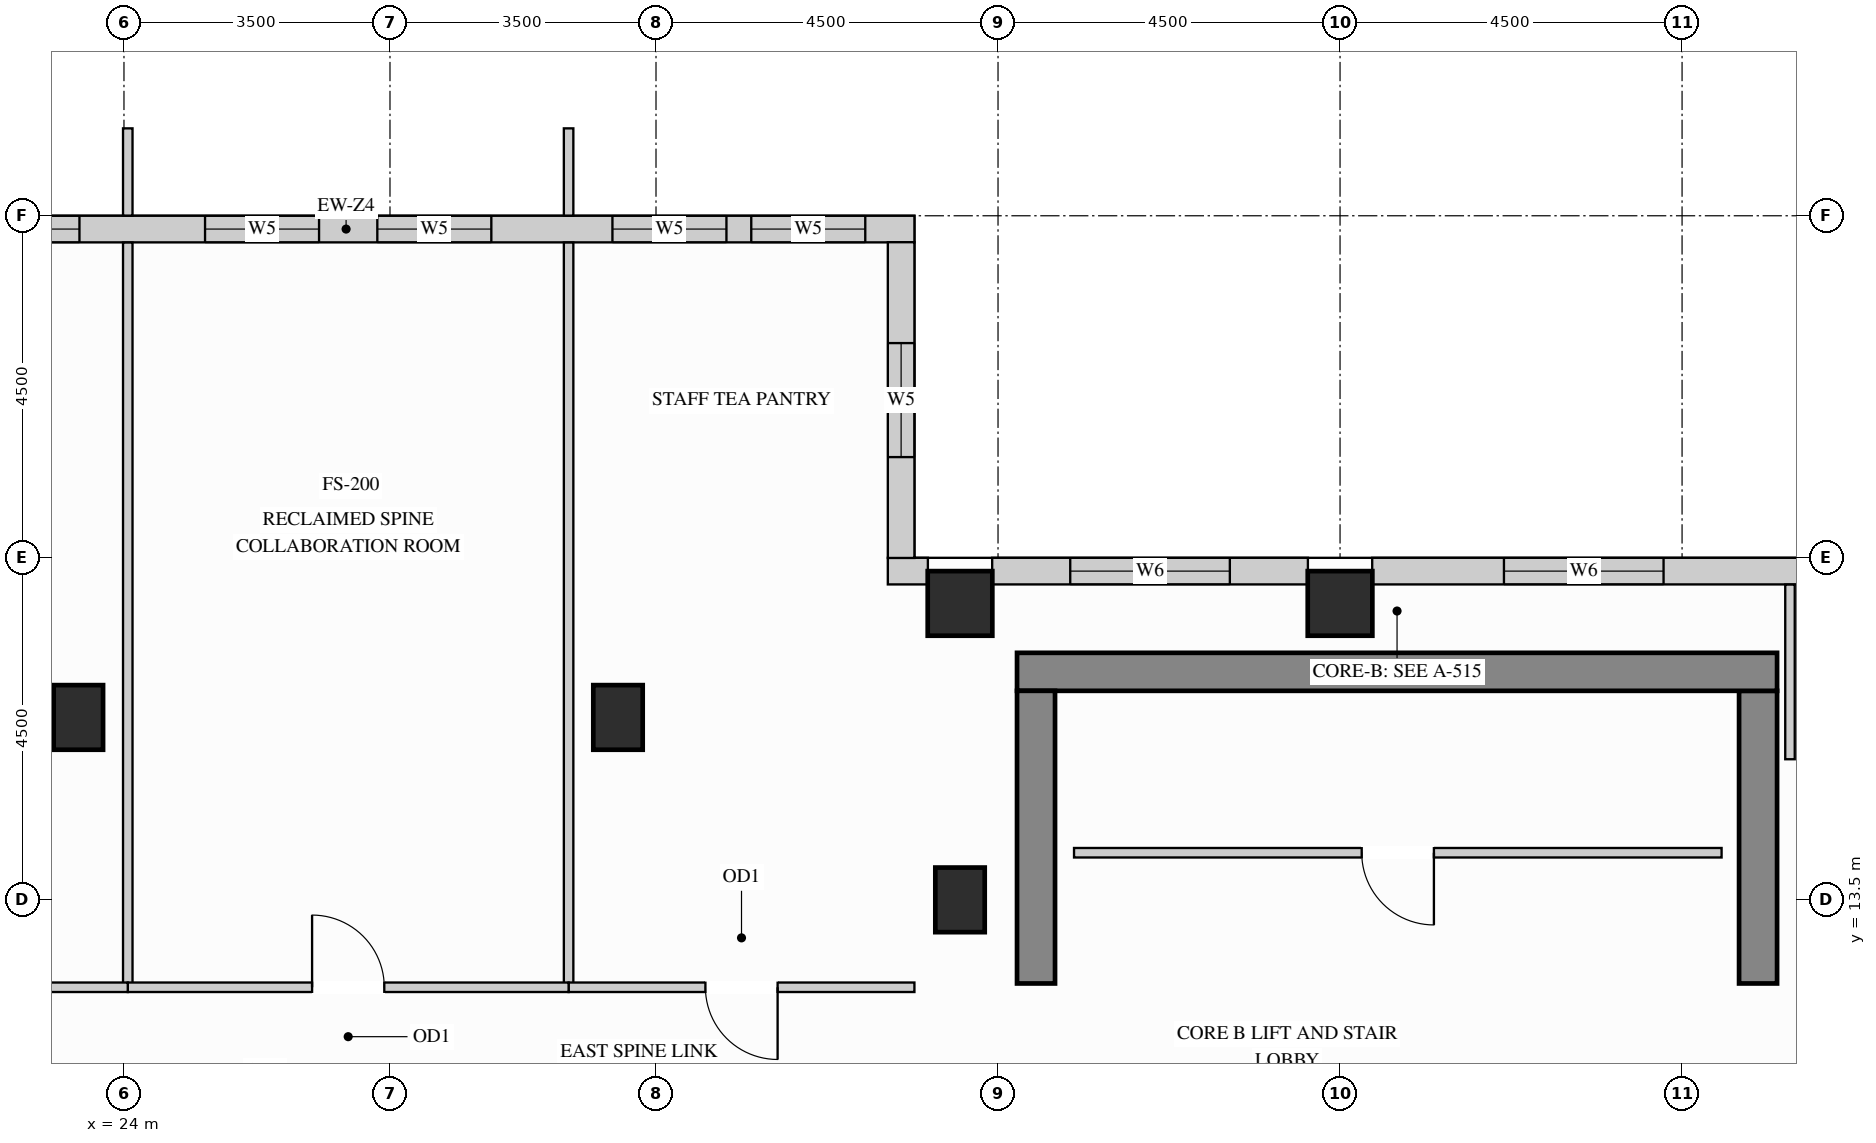
"""IFC4 building model, lengths in metres.
Left out: names, types, materials, properties, quantities, classifications, styles, units other than length and angle.
Written with IfcOpenShell. Run it as: python <this file> out.ifc"""

import sys

from ifc_helpers import new_model, si_unit, direction, frame, frame_2d, origin, origin_2d, place, context, subcontext, project, spatial, rectangle, extrude, source, transform, mapped, element, fill, save


model = new_model("IFC4")
c1 = context("Model", 3, precision=1e-05, world=origin(), true_north=direction((0.0, 1.0)))
c2 = subcontext(c1, "Body", "Model", "MODEL_VIEW")
j1 = project(units=[si_unit("LENGTHUNIT", "METRE"), si_unit("PLANEANGLEUNIT", "RADIAN")], contexts=[c1])
p1 = place(None, origin())
s1 = spatial("IfcSite", under=j1, at=p1, CompositionType="ELEMENT")
p2 = place(p1, origin())
s2 = spatial("IfcBuilding", under=s1, at=p2, CompositionType="ELEMENT")
p3 = place(p2, frame((0.0, 0.0, 255.6)))
s3 = spatial("IfcBuildingStorey", under=s2, at=p3, CompositionType="ELEMENT", Elevation=255.6)
m1 = source(origin(), c2, "Body", "SweptSolid", [
    extrude(rectangle(XDim=0.65, YDim=0.85, at=origin_2d()), origin(), (0.0, 0.0, 1.0), 3.4),
])
for number, where, z_axis, x_axis in (
    (1, (35.0, 13.5, 0.0), (0.0, 0.0, 1.0), (1.0, 0.0, 0.0)),
    (2, (23.4, 15.9, 0.0), (0.0, 0.0, 1.0), (1.0, 0.0, 0.0)),
    (3, (30.5, 15.9, 0.0), (0.0, 0.0, 1.0), (1.0, 0.0, 0.0)),
):
    element("IfcColumn", number, at=place(p3, frame(where, z_axis=z_axis, x_axis=x_axis)), inside=s3, PredefinedType="COLUMN", context=c2, shape_type="MappedRepresentation", body=[
        mapped(m1, transform((0.0, 0.0, 0.0), x_axis=(1.0, 0.0, 0.0), y_axis=(0.0, 1.0, 0.0), z_axis=(0.0, 0.0, 1.0))),
    ])
m2 = source(origin(), c2, "Body", "SweptSolid", [
    extrude(rectangle(XDim=0.85, YDim=0.85, at=origin_2d()), origin(), (0.0, 0.0, 1.0), 3.4),
])
for number, where, z_axis, x_axis in (
    (4, (35.0, 17.4, 0.0), (0.0, 0.0, 1.0), (1.0, 0.0, 0.0)),
    (5, (40.0, 17.4, 0.0), (0.0, 0.0, 1.0), (1.0, 0.0, 0.0)),
):
    element("IfcColumn", number, at=place(p3, frame(where, z_axis=z_axis, x_axis=x_axis)), inside=s3, PredefinedType="COLUMN", context=c2, shape_type="MappedRepresentation", body=[
        mapped(m2, transform((0.0, 0.0, 0.0), x_axis=(1.0, 0.0, 0.0), y_axis=(0.0, 1.0, 0.0), z_axis=(0.0, 0.0, 1.0))),
    ])
m3 = source(origin(), c2, "Body", "SweptSolid", [
    extrude(rectangle(XDim=3.85, YDim=0.5, at=frame_2d((1.925, 0.0))), origin(), (0.0, 0.0, 1.0), 3.4),
])
p4 = place(p3, frame((45.5, 12.4, 0.0), z_axis=(0.0, 0.0, 1.0), x_axis=(0.0, 1.0, 0.0)))
e6 = element("IfcWall", 6, at=p4, inside=s3, PredefinedType="SHEAR", context=c2, shape_type="MappedRepresentation", body=[
    mapped(m3, transform((0.0, 0.0, 0.0), x_axis=(1.0, 0.0, 0.0), y_axis=(0.0, 1.0, 0.0), z_axis=(0.0, 0.0, 1.0))),
])
m4 = source(origin(), c2, "Body", "SweptSolid", [
    extrude(rectangle(XDim=10.0, YDim=0.5, at=frame_2d((5.0, 0.0))), origin(), (0.0, 0.0, 1.0), 3.4),
])
p5 = place(p3, frame((35.75, 16.5, 0.0), z_axis=(0.0, 0.0, 1.0), x_axis=(1.0, 0.0, 0.0)))
e7 = element("IfcWall", 7, at=p5, inside=s3, PredefinedType="SHEAR", context=c2, shape_type="MappedRepresentation", body=[
    mapped(m4, transform((0.0, 0.0, 0.0), x_axis=(1.0, 0.0, 0.0), y_axis=(0.0, 1.0, 0.0), z_axis=(0.0, 0.0, 1.0))),
])
p6 = place(p3, frame((36.0, 12.4, 0.0), z_axis=(0.0, 0.0, 1.0), x_axis=(0.0, 1.0, 0.0)))
e8 = element("IfcWall", 8, at=p6, inside=s3, PredefinedType="SHEAR", context=c2, shape_type="MappedRepresentation", body=[
    mapped(m3, transform((0.0, 0.0, 0.0), x_axis=(1.0, 0.0, 0.0), y_axis=(0.0, 1.0, 0.0), z_axis=(0.0, 0.0, 1.0))),
])
p7 = place(p3, frame((34.4, 22.325, 0.0), z_axis=(0.0, 0.0, 1.0), x_axis=(-1.0, 0.0, 0.0)))
e9 = element("IfcWall", 9, at=p7, inside=s3, PredefinedType="SOLIDWALL", context=c2, shape_type="SweptSolid", body=[
    extrude(rectangle(XDim=15.077, YDim=0.35, at=frame_2d((7.539, 0.0))), origin(), (0.0, 0.0, 1.0), 3.385),
])
p8 = place(p7, frame((0.647, 0.0, 0.78)))
e10 = element("IfcOpeningElement", 10, at=p8, cuts=e9, PredefinedType="OPENING", context=c2, shape_type="SweptSolid", body=[
    extrude(rectangle(XDim=1.5, YDim=2.0, at=frame_2d((0.75, 1.0))), frame((0.0, 0.185, 0.0), z_axis=(0.0, -1.0, 0.0), x_axis=(1.0, 0.0, 0.0)), (0.0, 0.0, 1.0), 0.37),
])
p9 = place(p7, frame((2.473, 0.0, 0.78)))
e11 = element("IfcOpeningElement", 11, at=p9, cuts=e9, PredefinedType="OPENING", context=c2, shape_type="SweptSolid", body=[
    extrude(rectangle(XDim=1.5, YDim=2.0, at=frame_2d((0.75, 1.0))), frame((0.0, 0.185, 0.0), z_axis=(0.0, -1.0, 0.0), x_axis=(1.0, 0.0, 0.0)), (0.0, 0.0, 1.0), 0.37),
])
p10 = place(p7, frame((5.567, 0.0, 0.78)))
e12 = element("IfcOpeningElement", 12, at=p10, cuts=e9, PredefinedType="OPENING", context=c2, shape_type="SweptSolid", body=[
    extrude(rectangle(XDim=1.5, YDim=2.0, at=frame_2d((0.75, 1.0))), frame((0.0, 0.185, 0.0), z_axis=(0.0, -1.0, 0.0), x_axis=(1.0, 0.0, 0.0)), (0.0, 0.0, 1.0), 0.37),
])
p11 = place(p7, frame((7.833, 0.0, 0.78)))
e13 = element("IfcOpeningElement", 13, at=p11, cuts=e9, PredefinedType="OPENING", context=c2, shape_type="SweptSolid", body=[
    extrude(rectangle(XDim=1.5, YDim=2.0, at=frame_2d((0.75, 1.0))), frame((0.0, 0.185, 0.0), z_axis=(0.0, -1.0, 0.0), x_axis=(1.0, 0.0, 0.0)), (0.0, 0.0, 1.0), 0.37),
])
p12 = place(p7, frame((10.986, 0.0, 0.78)))
e14 = element("IfcOpeningElement", 14, at=p12, cuts=e9, PredefinedType="OPENING", context=c2, shape_type="SweptSolid", body=[
    extrude(rectangle(XDim=1.5, YDim=2.0, at=frame_2d((0.75, 1.0))), frame((0.0, 0.185, 0.0), z_axis=(0.0, -1.0, 0.0), x_axis=(1.0, 0.0, 0.0)), (0.0, 0.0, 1.0), 0.37),
])
p13 = place(p7, frame((12.871, 0.0, 0.78)))
e15 = element("IfcOpeningElement", 15, at=p13, cuts=e9, PredefinedType="OPENING", context=c2, shape_type="SweptSolid", body=[
    extrude(rectangle(XDim=1.5, YDim=2.0, at=frame_2d((0.75, 1.0))), frame((0.0, 0.185, 0.0), z_axis=(0.0, -1.0, 0.0), x_axis=(1.0, 0.0, 0.0)), (0.0, 0.0, 1.0), 0.37),
])
p14 = place(p3, frame((47.5, 17.825, 0.0), z_axis=(0.0, 0.0, 1.0), x_axis=(-1.0, 0.0, 0.0)))
e16 = element("IfcWall", 16, at=p14, inside=s3, PredefinedType="SOLIDWALL", context=c2, shape_type="SweptSolid", body=[
    extrude(rectangle(XDim=7.077, YDim=0.35, at=frame_2d((3.539, 0.0))), origin(), (0.0, 0.0, 1.0), 3.385),
])
p15 = place(p14, frame((3.243, 0.0, 0.78)))
e17 = element("IfcOpeningElement", 17, at=p15, cuts=e16, PredefinedType="OPENING", context=c2, shape_type="SweptSolid", body=[
    extrude(rectangle(XDim=2.1, YDim=2.25, at=frame_2d((1.05, 1.125))), frame((0.0, 0.185, 0.0), z_axis=(0.0, -1.0, 0.0), x_axis=(1.0, 0.0, 0.0)), (0.0, 0.0, 1.0), 0.37),
])
p16 = place(p3, frame((39.577, 17.825, 0.0), z_axis=(0.0, 0.0, 1.0), x_axis=(-1.0, 0.0, 0.0)))
e18 = element("IfcWall", 18, at=p16, inside=s3, PredefinedType="SOLIDWALL", context=c2, shape_type="SweptSolid", body=[
    extrude(rectangle(XDim=4.154, YDim=0.35, at=frame_2d((2.077, 0.0))), origin(), (0.0, 0.0, 1.0), 3.385),
])
p17 = place(p16, frame((1.027, 0.0, 0.78)))
e19 = element("IfcOpeningElement", 19, at=p17, cuts=e18, PredefinedType="OPENING", context=c2, shape_type="SweptSolid", body=[
    extrude(rectangle(XDim=2.1, YDim=2.25, at=frame_2d((1.05, 1.125))), frame((0.0, 0.185, 0.0), z_axis=(0.0, -1.0, 0.0), x_axis=(1.0, 0.0, 0.0)), (0.0, 0.0, 1.0), 0.37),
])
m5 = source(origin(), c2, "Body", "SweptSolid", [
    extrude(rectangle(XDim=0.527, YDim=0.35, at=frame_2d((0.263, 0.0))), origin(), (0.0, 0.0, 1.0), 3.385),
])
p18 = place(p3, frame((34.577, 17.825, 0.0), z_axis=(0.0, 0.0, 1.0), x_axis=(-1.0, 0.0, 0.0)))
e20 = element("IfcWall", 20, at=p18, inside=s3, PredefinedType="SOLIDWALL", context=c2, shape_type="MappedRepresentation", body=[
    mapped(m5, transform((0.0, 0.0, 0.0), x_axis=(1.0, 0.0, 0.0), y_axis=(0.0, 1.0, 0.0), z_axis=(0.0, 0.0, 1.0))),
])
p19 = place(p3, frame((34.225, 17.998, 0.0), z_axis=(0.0, 0.0, 1.0), x_axis=(0.0, 1.0, 0.0)))
e21 = element("IfcWall", 21, at=p19, inside=s3, PredefinedType="SOLIDWALL", context=c2, shape_type="SweptSolid", body=[
    extrude(rectangle(XDim=4.154, YDim=0.35, at=frame_2d((2.077, 0.0))), origin(), (0.0, 0.0, 1.0), 3.385),
])
p20 = place(p19, frame((1.327, 0.0, 0.78)))
e22 = element("IfcOpeningElement", 22, at=p20, cuts=e21, PredefinedType="OPENING", context=c2, shape_type="SweptSolid", body=[
    extrude(rectangle(XDim=1.5, YDim=2.0, at=frame_2d((0.75, 1.0))), frame((0.0, 0.185, 0.0), z_axis=(0.0, -1.0, 0.0), x_axis=(1.0, 0.0, 0.0)), (0.0, 0.0, 1.0), 0.37),
])
p21 = place(p3, frame((36.5, 14.12, 0.0), z_axis=(0.0, 0.0, 1.0), x_axis=(1.0, 0.0, 0.0)))
e23 = element("IfcWall", 23, at=p21, inside=s3, PredefinedType="PARTITIONING", context=c2, shape_type="SweptSolid", body=[
    extrude(rectangle(XDim=8.52, YDim=0.125, at=frame_2d((4.26, 0.0))), origin(), (0.0, 0.0, 1.0), 3.385),
])
p22 = place(p21, frame((3.785, 0.0, 0.0)))
e24 = element("IfcOpeningElement", 24, at=p22, cuts=e23, PredefinedType="OPENING", context=c2, shape_type="SweptSolid", body=[
    extrude(rectangle(XDim=0.95, YDim=2.15, at=frame_2d((0.475, 1.075))), frame((0.0, 0.073, 0.0), z_axis=(0.0, -1.0, 0.0), x_axis=(1.0, 0.0, 0.0)), (0.0, 0.0, 1.0), 0.145),
])
m6 = source(origin(), c2, "Body", "SweptSolid", [
    extrude(rectangle(XDim=2.298, YDim=0.125, at=frame_2d((1.149, 0.0))), origin(), (0.0, 0.0, 1.0), 3.385),
])
p23 = place(p3, frame((45.92, 15.35, 0.0), z_axis=(0.0, 0.0, 1.0), x_axis=(0.0, 1.0, 0.0)))
e25 = element("IfcWall", 25, at=p23, inside=s3, PredefinedType="PARTITIONING", context=c2, shape_type="MappedRepresentation", body=[
    mapped(m6, transform((0.0, 0.0, 0.0), x_axis=(1.0, 0.0, 0.0), y_axis=(0.0, 1.0, 0.0), z_axis=(0.0, 0.0, 1.0))),
])
m7 = source(origin(), c2, "Body", "SweptSolid", [
    extrude(rectangle(XDim=9.798, YDim=0.125, at=frame_2d((4.899, 0.0))), origin(), (0.0, 0.0, 1.0), 3.385),
])
p24 = place(p3, frame((24.05, 12.35, 0.0), z_axis=(0.0, 0.0, 1.0), x_axis=(0.0, 1.0, 0.0)))
e26 = element("IfcWall", 26, at=p24, inside=s3, PredefinedType="PARTITIONING", context=c2, shape_type="MappedRepresentation", body=[
    mapped(m7, transform((0.0, 0.0, 0.0), x_axis=(1.0, 0.0, 0.0), y_axis=(0.0, 1.0, 0.0), z_axis=(0.0, 0.0, 1.0))),
])
m8 = source(origin(), c2, "Body", "SweptSolid", [
    extrude(rectangle(XDim=1.148, YDim=0.125, at=frame_2d((0.574, 0.0))), origin(), (0.0, 0.0, 1.0), 3.385),
])
p25 = place(p3, frame((24.05, 22.502, 0.0), z_axis=(0.0, 0.0, 1.0), x_axis=(0.0, 1.0, 0.0)))
e27 = element("IfcWall", 27, at=p25, inside=s3, PredefinedType="PARTITIONING", context=c2, shape_type="MappedRepresentation", body=[
    mapped(m8, transform((0.0, 0.0, 0.0), x_axis=(1.0, 0.0, 0.0), y_axis=(0.0, 1.0, 0.0), z_axis=(0.0, 0.0, 1.0))),
])
p26 = place(p3, frame((29.85, 12.35, 0.0), z_axis=(0.0, 0.0, 1.0), x_axis=(0.0, 1.0, 0.0)))
e28 = element("IfcWall", 28, at=p26, inside=s3, PredefinedType="PARTITIONING", context=c2, shape_type="MappedRepresentation", body=[
    mapped(m7, transform((0.0, 0.0, 0.0), x_axis=(1.0, 0.0, 0.0), y_axis=(0.0, 1.0, 0.0), z_axis=(0.0, 0.0, 1.0))),
])
p27 = place(p3, frame((29.85, 22.502, 0.0), z_axis=(0.0, 0.0, 1.0), x_axis=(0.0, 1.0, 0.0)))
e29 = element("IfcWall", 29, at=p27, inside=s3, PredefinedType="PARTITIONING", context=c2, shape_type="MappedRepresentation", body=[
    mapped(m8, transform((0.0, 0.0, 0.0), x_axis=(1.0, 0.0, 0.0), y_axis=(0.0, 1.0, 0.0), z_axis=(0.0, 0.0, 1.0))),
])
p28 = place(p3, frame((29.85, 12.35, 0.0), z_axis=(0.0, 0.0, 1.0), x_axis=(1.0, 0.0, 0.0)))
e30 = element("IfcWall", 30, at=p28, inside=s3, PredefinedType="PARTITIONING", context=c2, shape_type="SweptSolid", body=[
    extrude(rectangle(XDim=4.55, YDim=0.125, at=frame_2d((2.275, 0.0))), origin(), (0.0, 0.0, 1.0), 3.385),
])
p29 = place(p28, frame((1.8, 0.0, 0.0)))
e31 = element("IfcOpeningElement", 31, at=p29, cuts=e30, PredefinedType="OPENING", context=c2, shape_type="SweptSolid", body=[
    extrude(rectangle(XDim=0.95, YDim=2.15, at=frame_2d((0.475, 1.075))), frame((0.0, 0.073, 0.0), z_axis=(0.0, -1.0, 0.0), x_axis=(1.0, 0.0, 0.0)), (0.0, 0.0, 1.0), 0.145),
])
p30 = place(p3, frame((24.05, 12.35, 0.0), z_axis=(0.0, 0.0, 1.0), x_axis=(1.0, 0.0, 0.0)))
e32 = element("IfcWall", 32, at=p30, inside=s3, PredefinedType="PARTITIONING", context=c2, shape_type="SweptSolid", body=[
    extrude(rectangle(XDim=5.8, YDim=0.125, at=frame_2d((2.9, 0.0))), origin(), (0.0, 0.0, 1.0), 3.385),
])
p31 = place(p30, frame((2.425, 0.0, 0.0)))
e33 = element("IfcOpeningElement", 33, at=p31, cuts=e32, PredefinedType="OPENING", context=c2, shape_type="SweptSolid", body=[
    extrude(rectangle(XDim=0.95, YDim=2.15, at=frame_2d((0.475, 1.075))), frame((0.0, 0.073, 0.0), z_axis=(0.0, -1.0, 0.0), x_axis=(1.0, 0.0, 0.0)), (0.0, 0.0, 1.0), 0.145),
])
p32 = place(p3, frame((19.5, 12.35, 0.0), z_axis=(0.0, 0.0, 1.0), x_axis=(1.0, 0.0, 0.0)))
e34 = element("IfcWall", 34, at=p32, inside=s3, PredefinedType="PARTITIONING", context=c2, shape_type="SweptSolid", body=[
    extrude(rectangle(XDim=4.55, YDim=0.125, at=frame_2d((2.275, 0.0))), origin(), (0.0, 0.0, 1.0), 3.385),
])
p33 = place(p32, frame((1.8, 0.0, 0.0)))
e35 = element("IfcOpeningElement", 35, at=p33, cuts=e34, PredefinedType="OPENING", context=c2, shape_type="SweptSolid", body=[
    extrude(rectangle(XDim=0.95, YDim=2.15, at=frame_2d((0.475, 1.075))), frame((0.0, 0.073, 0.0), z_axis=(0.0, -1.0, 0.0), x_axis=(1.0, 0.0, 0.0)), (0.0, 0.0, 1.0), 0.145),
])
m9 = source(origin(), c2, "Body", "SweptSolid", [
    extrude(rectangle(XDim=0.95, YDim=2.15, at=frame_2d((0.475, 1.075))), frame((0.0, 0.025, 0.0), z_axis=(0.0, -1.0, 0.0), x_axis=(1.0, 0.0, 0.0)), (0.0, 0.0, 1.0), 0.05),
])
p34 = place(p22, origin())
e36 = element("IfcDoor", 36, at=p34, inside=s3, OperationType="SINGLE_SWING_RIGHT", PredefinedType="DOOR", context=c2, shape_type="MappedRepresentation", body=[
    mapped(m9, transform((0.0, 0.0, 0.0), x_axis=(1.0, 0.0, 0.0), y_axis=(0.0, 1.0, 0.0), z_axis=(0.0, 0.0, 1.0))),
])
fill(e24, e36)
p35 = place(p31, origin())
e37 = element("IfcDoor", 37, at=p35, inside=s3, OperationType="SINGLE_SWING_LEFT", PredefinedType="DOOR", context=c2, shape_type="MappedRepresentation", body=[
    mapped(m9, transform((0.0, 0.0, 0.0), x_axis=(1.0, 0.0, 0.0), y_axis=(0.0, 1.0, 0.0), z_axis=(0.0, 0.0, 1.0))),
])
fill(e33, e37)
p36 = place(p29, origin())
e38 = element("IfcDoor", 38, at=p36, inside=s3, OperationType="SINGLE_SWING_RIGHT", PredefinedType="DOOR", context=c2, shape_type="MappedRepresentation", body=[
    mapped(m9, transform((0.0, 0.0, 0.0), x_axis=(1.0, 0.0, 0.0), y_axis=(0.0, 1.0, 0.0), z_axis=(0.0, 0.0, 1.0))),
])
fill(e31, e38)
m10 = source(origin(), c2, "Body", "SweptSolid", [
    extrude(rectangle(XDim=1.5, YDim=2.0, at=frame_2d((0.75, 1.0))), frame((0.0, 0.03, 0.0), z_axis=(0.0, -1.0, 0.0), x_axis=(1.0, 0.0, 0.0)), (0.0, 0.0, 1.0), 0.06),
])
p37 = place(p8, origin())
e39 = element("IfcWindow", 39, at=p37, inside=s3, PartitioningType="SINGLE_PANEL", PredefinedType="WINDOW", context=c2, shape_type="MappedRepresentation", body=[
    mapped(m10, transform((0.0, 0.0, 0.0), x_axis=(1.0, 0.0, 0.0), y_axis=(0.0, 1.0, 0.0), z_axis=(0.0, 0.0, 1.0))),
])
fill(e10, e39)
p38 = place(p9, origin())
e40 = element("IfcWindow", 40, at=p38, inside=s3, PartitioningType="SINGLE_PANEL", PredefinedType="WINDOW", context=c2, shape_type="MappedRepresentation", body=[
    mapped(m10, transform((0.0, 0.0, 0.0), x_axis=(1.0, 0.0, 0.0), y_axis=(0.0, 1.0, 0.0), z_axis=(0.0, 0.0, 1.0))),
])
fill(e11, e40)
p39 = place(p10, origin())
e41 = element("IfcWindow", 41, at=p39, inside=s3, PartitioningType="SINGLE_PANEL", PredefinedType="WINDOW", context=c2, shape_type="MappedRepresentation", body=[
    mapped(m10, transform((0.0, 0.0, 0.0), x_axis=(1.0, 0.0, 0.0), y_axis=(0.0, 1.0, 0.0), z_axis=(0.0, 0.0, 1.0))),
])
fill(e12, e41)
p40 = place(p11, origin())
e42 = element("IfcWindow", 42, at=p40, inside=s3, PartitioningType="SINGLE_PANEL", PredefinedType="WINDOW", context=c2, shape_type="MappedRepresentation", body=[
    mapped(m10, transform((0.0, 0.0, 0.0), x_axis=(1.0, 0.0, 0.0), y_axis=(0.0, 1.0, 0.0), z_axis=(0.0, 0.0, 1.0))),
])
fill(e13, e42)
p41 = place(p12, origin())
e43 = element("IfcWindow", 43, at=p41, inside=s3, PartitioningType="SINGLE_PANEL", PredefinedType="WINDOW", context=c2, shape_type="MappedRepresentation", body=[
    mapped(m10, transform((0.0, 0.0, 0.0), x_axis=(1.0, 0.0, 0.0), y_axis=(0.0, 1.0, 0.0), z_axis=(0.0, 0.0, 1.0))),
])
fill(e14, e43)
p42 = place(p20, origin())
e44 = element("IfcWindow", 44, at=p42, inside=s3, PartitioningType="SINGLE_PANEL", PredefinedType="WINDOW", context=c2, shape_type="MappedRepresentation", body=[
    mapped(m10, transform((0.0, 0.0, 0.0), x_axis=(1.0, 0.0, 0.0), y_axis=(0.0, 1.0, 0.0), z_axis=(0.0, 0.0, 1.0))),
])
fill(e22, e44)
m11 = source(origin(), c2, "Body", "SweptSolid", [
    extrude(rectangle(XDim=2.1, YDim=2.25, at=frame_2d((1.05, 1.125))), frame((0.0, 0.03, 0.0), z_axis=(0.0, -1.0, 0.0), x_axis=(1.0, 0.0, 0.0)), (0.0, 0.0, 1.0), 0.06),
])
p43 = place(p15, origin())
e45 = element("IfcWindow", 45, at=p43, inside=s3, PartitioningType="SINGLE_PANEL", PredefinedType="WINDOW", context=c2, shape_type="MappedRepresentation", body=[
    mapped(m11, transform((0.0, 0.0, 0.0), x_axis=(1.0, 0.0, 0.0), y_axis=(0.0, 1.0, 0.0), z_axis=(0.0, 0.0, 1.0))),
])
fill(e17, e45)
p44 = place(p17, origin())
e46 = element("IfcWindow", 46, at=p44, inside=s3, PartitioningType="SINGLE_PANEL", PredefinedType="WINDOW", context=c2, shape_type="MappedRepresentation", body=[
    mapped(m11, transform((0.0, 0.0, 0.0), x_axis=(1.0, 0.0, 0.0), y_axis=(0.0, 1.0, 0.0), z_axis=(0.0, 0.0, 1.0))),
])
fill(e19, e46)
save(model, sys.argv[1])
